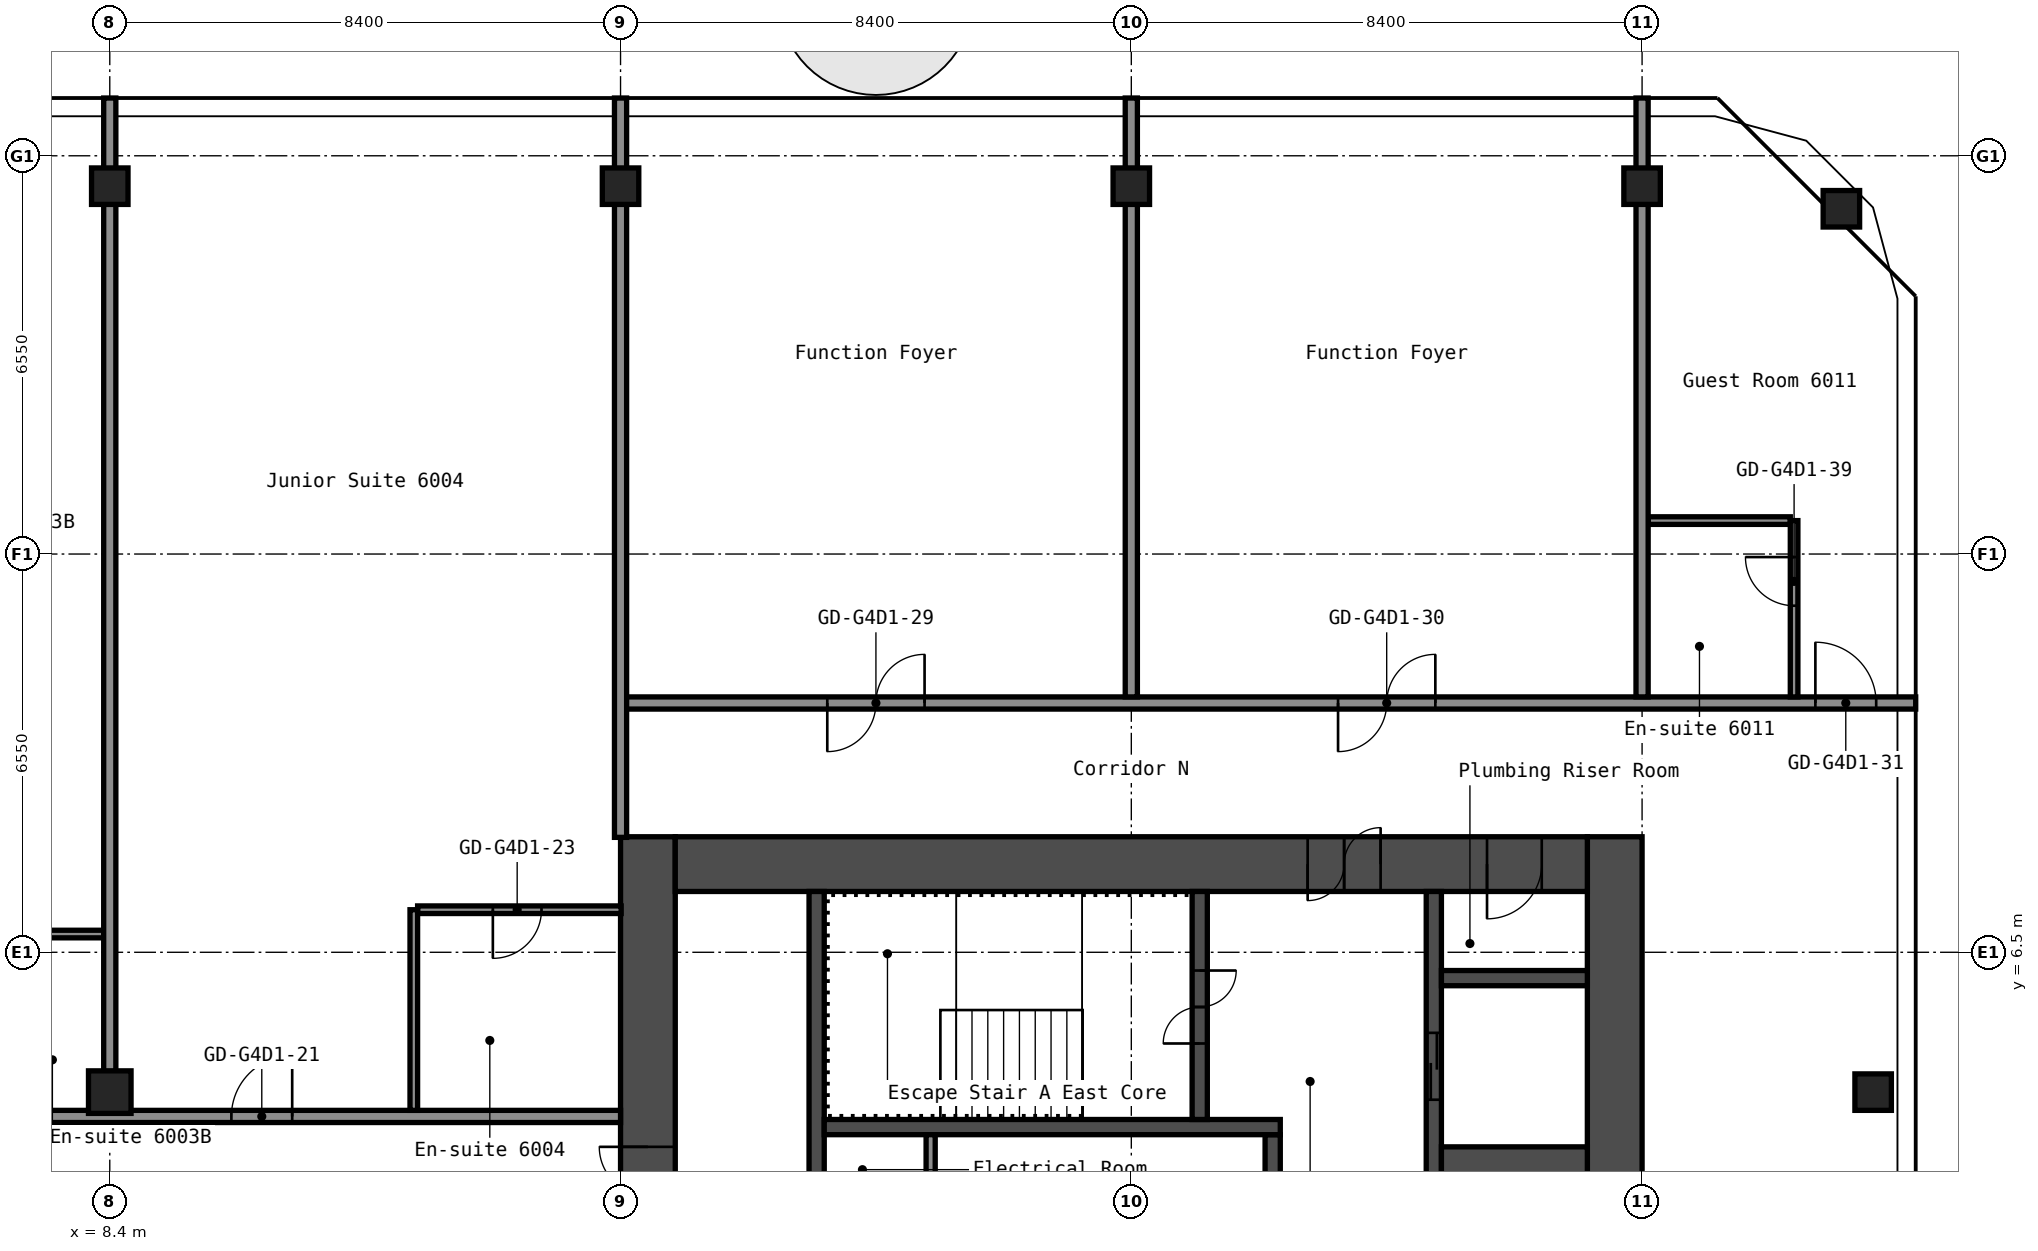
"""IFC4 building model, lengths in metres.
Left out: names, types, materials, properties, quantities, classifications, styles, units other than length and angle.
Written with IfcOpenShell. Run it as: python <this file> out.ifc"""

import sys

from ifc_helpers import new_model, si_unit, direction, frame, frame_2d, origin, origin_2d, place, context, subcontext, project, spatial, rectangle, hollow_rectangle, extrude, element, fill, save


model = new_model("IFC4")
c1 = context("Model", 3, precision=1e-05, world=origin(), true_north=direction((0.0, 1.0)))
c2 = subcontext(c1, "Body", "Model", "MODEL_VIEW")
j1 = project(units=[si_unit("LENGTHUNIT", "METRE"), si_unit("PLANEANGLEUNIT", "RADIAN")], contexts=[c1])
p1 = place(None, origin())
s1 = spatial("IfcSite", under=j1, at=p1, CompositionType="ELEMENT")
p2 = place(p1, origin())
s2 = spatial("IfcBuilding", under=s1, at=p2, CompositionType="ELEMENT")
p3 = place(p2, frame((0.0, 0.0, 212.2)))
s3 = spatial("IfcBuildingStorey", under=s2, at=p3, CompositionType="ELEMENT", Elevation=212.2)
p4 = place(p3, frame((8.4, 4.2, 0.0), z_axis=(0.0, 0.0, 1.0), x_axis=(1.0, 0.0, 0.0)))
e1 = element("IfcColumn", 1, at=p4, inside=s3, PredefinedType="COLUMN", context=c2, shape_type="SweptSolid", body=[
    extrude(hollow_rectangle(XDim=0.7, YDim=0.7, WallThickness=0.028, at=origin_2d()), origin(), (0.0, 0.0, 1.0), 2.75),
])
for number, where, z_axis, x_axis in (
    (2, (8.4, 19.1, 0.0), (0.0, 0.0, 1.0), (1.0, 0.0, 0.0)),
    (3, (16.8, 19.1, 0.0), (0.0, 0.0, 1.0), (1.0, 0.0, 0.0)),
    (4, (25.2, 19.1, 0.0), (0.0, 0.0, 1.0), (1.0, 0.0, 0.0)),
    (5, (33.6, 19.1, 0.0), (0.0, 0.0, 1.0), (1.0, 0.0, 0.0)),
    (6, (37.4, 4.2, 0.0), (0.0, 0.0, 1.0), (1.0, 0.0, 0.0)),
    (7, (36.878, 18.729, 0.0), (0.0, 0.0, 1.0), (1.0, 0.0, 0.0)),
):
    element("IfcColumn", number, at=place(p3, frame(where, z_axis=z_axis, x_axis=x_axis)), inside=s3, PredefinedType="COLUMN", context=c2, shape_type="SweptSolid", body=[
        extrude(hollow_rectangle(XDim=0.6, YDim=0.6, WallThickness=0.025, InnerFilletRadius=0.038, OuterFilletRadius=0.062, at=origin_2d()), origin(), (0.0, 0.0, 1.0), 2.75),
    ])
p5 = place(p3, frame((17.25, -8.4, 0.0), z_axis=(0.0, 0.0, 1.0), x_axis=(0.0, 1.0, 0.0)))
e8 = element("IfcWall", 8, at=p5, inside=s3, PredefinedType="SHEAR", context=c2, shape_type="SweptSolid", body=[
    extrude(rectangle(XDim=16.8, YDim=0.9, at=frame_2d((8.4, 0.0))), origin(), (0.0, 0.0, 1.0), 2.75),
])
p6 = place(p5, frame((10.1, 0.0, 0.0)))
e9 = element("IfcOpeningElement", 9, at=p6, cuts=e8, PredefinedType="OPENING", context=c2, shape_type="SweptSolid", body=[
    extrude(rectangle(XDim=1.6, YDim=2.1, at=frame_2d((0.8, 1.05))), frame((0.0, 0.46, 0.0), z_axis=(0.0, -1.0, 0.0), x_axis=(1.0, 0.0, 0.0)), (0.0, 0.0, 1.0), 0.92),
])
p7 = place(p3, frame((33.15, -8.4, 0.0), z_axis=(0.0, 0.0, 1.0), x_axis=(0.0, 1.0, 0.0)))
e10 = element("IfcWall", 10, at=p7, inside=s3, PredefinedType="SHEAR", context=c2, shape_type="SweptSolid", body=[
    extrude(rectangle(XDim=16.8, YDim=0.9, at=frame_2d((8.4, 0.0))), origin(), (0.0, 0.0, 1.0), 2.75),
])
p8 = place(p3, frame((17.7, 7.95, 0.0), z_axis=(0.0, 0.0, 1.0), x_axis=(1.0, 0.0, 0.0)))
e11 = element("IfcWall", 11, at=p8, inside=s3, PredefinedType="SHEAR", context=c2, shape_type="SweptSolid", body=[
    extrude(rectangle(XDim=15.0, YDim=0.9, at=frame_2d((7.5, 0.0))), origin(), (0.0, 0.0, 1.0), 2.75),
])
p9 = place(p8, frame((10.4, 0.0, 0.0)))
e12 = element("IfcOpeningElement", 12, at=p9, cuts=e11, PredefinedType="OPENING", context=c2, shape_type="SweptSolid", body=[
    extrude(rectangle(XDim=1.2, YDim=2.1, at=frame_2d((0.6, 1.05))), frame((0.0, 0.46, 0.0), z_axis=(0.0, -1.0, 0.0), x_axis=(1.0, 0.0, 0.0)), (0.0, 0.0, 1.0), 0.92),
])
p10 = place(p8, frame((13.35, 0.0, 0.0)))
e13 = element("IfcOpeningElement", 13, at=p10, cuts=e11, PredefinedType="OPENING", context=c2, shape_type="SweptSolid", body=[
    extrude(rectangle(XDim=0.9, YDim=2.1, at=frame_2d((0.45, 1.05))), frame((0.0, 0.46, 0.0), z_axis=(0.0, -1.0, 0.0), x_axis=(1.0, 0.0, 0.0)), (0.0, 0.0, 1.0), 0.92),
])
p11 = place(p3, frame((20.025, 1.2, 0.0), z_axis=(0.0, 0.0, 1.0), x_axis=(0.0, 1.0, 0.0)))
e14 = element("IfcWall", 14, at=p11, inside=s3, PredefinedType="SHEAR", context=c2, shape_type="SweptSolid", body=[
    extrude(rectangle(XDim=6.3, YDim=0.25, at=frame_2d((3.15, 0.0))), origin(), (0.0, 0.0, 1.0), 2.75),
])
p12 = place(p3, frame((27.525, 1.45, 0.0), z_axis=(0.0, 0.0, 1.0), x_axis=(0.0, 1.0, 0.0)))
e15 = element("IfcWall", 15, at=p12, inside=s3, PredefinedType="SHEAR", context=c2, shape_type="SweptSolid", body=[
    extrude(rectangle(XDim=2.05, YDim=0.25, at=frame_2d((1.025, 0.0))), origin(), (0.0, 0.0, 1.0), 2.75),
])
p13 = place(p3, frame((20.15, 3.625, 0.0), z_axis=(0.0, 0.0, 1.0), x_axis=(1.0, 0.0, 0.0)))
e16 = element("IfcWall", 16, at=p13, inside=s3, PredefinedType="SHEAR", context=c2, shape_type="SweptSolid", body=[
    extrude(rectangle(XDim=7.5, YDim=0.25, at=frame_2d((3.75, 0.0))), origin(), (0.0, 0.0, 1.0), 2.75),
])
p14 = place(p3, frame((26.325, 3.75, 0.0), z_axis=(0.0, 0.0, 1.0), x_axis=(0.0, 1.0, 0.0)))
e17 = element("IfcWall", 17, at=p14, inside=s3, PredefinedType="SHEAR", context=c2, shape_type="SweptSolid", body=[
    extrude(rectangle(XDim=3.75, YDim=0.25, at=frame_2d((1.875, 0.0))), origin(), (0.0, 0.0, 1.0), 2.75),
])
p15 = place(p14, frame((1.25, 0.0, 0.0)))
e18 = element("IfcOpeningElement", 18, at=p15, cuts=e17, PredefinedType="OPENING", context=c2, shape_type="SweptSolid", body=[
    extrude(rectangle(XDim=1.2, YDim=2.1, at=frame_2d((0.6, 1.05))), frame((0.0, 0.135, 0.0), z_axis=(0.0, -1.0, 0.0), x_axis=(1.0, 0.0, 0.0)), (0.0, 0.0, 1.0), 0.27),
])
p16 = place(p3, frame((30.175, 1.45, 0.0), z_axis=(0.0, 0.0, 1.0), x_axis=(0.0, 1.0, 0.0)))
e19 = element("IfcWall", 19, at=p16, inside=s3, PredefinedType="SHEAR", context=c2, shape_type="SweptSolid", body=[
    extrude(rectangle(XDim=6.05, YDim=0.25, at=frame_2d((3.025, 0.0))), origin(), (0.0, 0.0, 1.0), 2.75),
])
p17 = place(p16, frame((2.625, 0.0, 0.0)))
e20 = element("IfcOpeningElement", 20, at=p17, cuts=e19, PredefinedType="OPENING", context=c2, shape_type="SweptSolid", body=[
    extrude(rectangle(XDim=1.1, YDim=2.1, at=frame_2d((0.55, 1.05))), frame((0.0, 0.135, 0.0), z_axis=(0.0, -1.0, 0.0), x_axis=(1.0, 0.0, 0.0)), (0.0, 0.0, 1.0), 0.27),
])
p18 = place(p3, frame((30.3, 2.375, 0.0), z_axis=(0.0, 0.0, 1.0), x_axis=(1.0, 0.0, 0.0)))
e21 = element("IfcWall", 21, at=p18, inside=s3, PredefinedType="SHEAR", context=c2, shape_type="SweptSolid", body=[
    extrude(rectangle(XDim=2.4, YDim=1.85, at=frame_2d((1.2, 0.0))), origin(), (0.0, 0.0, 1.0), 2.75),
])
p19 = place(p3, frame((30.3, 6.075, 0.0), z_axis=(0.0, 0.0, 1.0), x_axis=(1.0, 0.0, 0.0)))
e22 = element("IfcWall", 22, at=p19, inside=s3, PredefinedType="SHEAR", context=c2, shape_type="SweptSolid", body=[
    extrude(rectangle(XDim=2.4, YDim=0.25, at=frame_2d((1.2, 0.0))), origin(), (0.0, 0.0, 1.0), 2.75),
])
p20 = place(p3, frame((21.9, 1.45, 0.0), z_axis=(0.0, 0.0, 1.0), x_axis=(0.0, 1.0, 0.0)))
e23 = element("IfcWall", 23, at=p20, inside=s3, PredefinedType="PARTITIONING", context=c2, shape_type="SweptSolid", body=[
    extrude(rectangle(XDim=2.05, YDim=0.15, at=frame_2d((1.025, 0.0))), origin(), (0.0, 0.0, 1.0), 2.75),
])
p21 = place(p3, frame((-16.8, 3.8, 0.0), z_axis=(0.0, 0.0, 1.0), x_axis=(1.0, 0.0, 0.0)))
e24 = element("IfcWall", 24, at=p21, inside=s3, PredefinedType="PARTITIONING", context=c2, shape_type="SweptSolid", body=[
    extrude(rectangle(XDim=33.6, YDim=0.2, at=frame_2d((16.8, 0.0))), origin(), (0.0, 0.0, 1.0), 2.75),
])
p22 = place(p21, frame((2.85, 0.0, 0.0)))
e25 = element("IfcOpeningElement", 25, at=p22, cuts=e24, PredefinedType="OPENING", context=c2, shape_type="SweptSolid", body=[
    extrude(rectangle(XDim=1.0, YDim=2.1, at=frame_2d((0.5, 1.05))), frame((0.0, 0.11, 0.0), z_axis=(0.0, -1.0, 0.0), x_axis=(1.0, 0.0, 0.0)), (0.0, 0.0, 1.0), 0.22),
])
p23 = place(p21, frame((4.55, 0.0, 0.0)))
e26 = element("IfcOpeningElement", 26, at=p23, cuts=e24, PredefinedType="OPENING", context=c2, shape_type="SweptSolid", body=[
    extrude(rectangle(XDim=1.0, YDim=2.1, at=frame_2d((0.5, 1.05))), frame((0.0, 0.11, 0.0), z_axis=(0.0, -1.0, 0.0), x_axis=(1.0, 0.0, 0.0)), (0.0, 0.0, 1.0), 0.22),
])
p24 = place(p21, frame((10.4, 0.0, 0.0)))
e27 = element("IfcOpeningElement", 27, at=p24, cuts=e24, PredefinedType="OPENING", context=c2, shape_type="SweptSolid", body=[
    extrude(rectangle(XDim=1.0, YDim=2.1, at=frame_2d((0.5, 1.05))), frame((0.0, 0.11, 0.0), z_axis=(0.0, -1.0, 0.0), x_axis=(1.0, 0.0, 0.0)), (0.0, 0.0, 1.0), 0.22),
])
p25 = place(p21, frame((19.65, 0.0, 0.0)))
e28 = element("IfcOpeningElement", 28, at=p25, cuts=e24, PredefinedType="OPENING", context=c2, shape_type="SweptSolid", body=[
    extrude(rectangle(XDim=1.0, YDim=2.1, at=frame_2d((0.5, 1.05))), frame((0.0, 0.11, 0.0), z_axis=(0.0, -1.0, 0.0), x_axis=(1.0, 0.0, 0.0)), (0.0, 0.0, 1.0), 0.22),
])
p26 = place(p21, frame((21.35, 0.0, 0.0)))
e29 = element("IfcOpeningElement", 29, at=p26, cuts=e24, PredefinedType="OPENING", context=c2, shape_type="SweptSolid", body=[
    extrude(rectangle(XDim=1.0, YDim=2.1, at=frame_2d((0.5, 1.05))), frame((0.0, 0.11, 0.0), z_axis=(0.0, -1.0, 0.0), x_axis=(1.0, 0.0, 0.0)), (0.0, 0.0, 1.0), 0.22),
])
p27 = place(p21, frame((27.2, 0.0, 0.0)))
e30 = element("IfcOpeningElement", 30, at=p27, cuts=e24, PredefinedType="OPENING", context=c2, shape_type="SweptSolid", body=[
    extrude(rectangle(XDim=1.0, YDim=2.1, at=frame_2d((0.5, 1.05))), frame((0.0, 0.11, 0.0), z_axis=(0.0, -1.0, 0.0), x_axis=(1.0, 0.0, 0.0)), (0.0, 0.0, 1.0), 0.22),
])
p28 = place(p3, frame((5.962, 6.8, 0.0), z_axis=(0.0, 0.0, 1.0), x_axis=(1.0, 0.0, 0.0)))
e31 = element("IfcWall", 31, at=p28, inside=s3, PredefinedType="PARTITIONING", context=c2, shape_type="SweptSolid", body=[
    extrude(rectangle(XDim=2.338, YDim=0.125, at=frame_2d((1.169, 0.0))), origin(), (0.0, 0.0, 1.0), 2.75),
])
p29 = place(p3, frame((13.462, 7.2, 0.0), z_axis=(0.0, 0.0, 1.0), x_axis=(1.0, 0.0, 0.0)))
e32 = element("IfcWall", 32, at=p29, inside=s3, PredefinedType="PARTITIONING", context=c2, shape_type="SweptSolid", body=[
    extrude(rectangle(XDim=3.348, YDim=0.125, at=frame_2d((1.674, 0.0))), origin(), (0.0, 0.0, 1.0), 2.75),
])
p30 = place(p29, frame((1.238, 0.0, 0.0)))
e33 = element("IfcOpeningElement", 33, at=p30, cuts=e32, PredefinedType="OPENING", context=c2, shape_type="SweptSolid", body=[
    extrude(rectangle(XDim=0.8, YDim=2.1, at=frame_2d((0.4, 1.05))), frame((0.0, 0.073, 0.0), z_axis=(0.0, -1.0, 0.0), x_axis=(1.0, 0.0, 0.0)), (0.0, 0.0, 1.0), 0.145),
])
p31 = place(p3, frame((16.8, 10.6, 0.0), z_axis=(0.0, 0.0, 1.0), x_axis=(1.0, 0.0, 0.0)))
e34 = element("IfcWall", 34, at=p31, inside=s3, PredefinedType="PARTITIONING", context=c2, shape_type="SweptSolid", body=[
    extrude(rectangle(XDim=21.3, YDim=0.2, at=frame_2d((10.65, 0.0))), origin(), (0.0, 0.0, 1.0), 2.75),
])
p32 = place(p31, frame((3.4, 0.0, 0.0)))
e35 = element("IfcOpeningElement", 35, at=p32, cuts=e34, PredefinedType="OPENING", context=c2, shape_type="SweptSolid", body=[
    extrude(rectangle(XDim=1.6, YDim=2.1, at=frame_2d((0.8, 1.05))), frame((0.0, 0.11, 0.0), z_axis=(0.0, -1.0, 0.0), x_axis=(1.0, 0.0, 0.0)), (0.0, 0.0, 1.0), 0.22),
])
p33 = place(p31, frame((11.8, 0.0, 0.0)))
e36 = element("IfcOpeningElement", 36, at=p33, cuts=e34, PredefinedType="OPENING", context=c2, shape_type="SweptSolid", body=[
    extrude(rectangle(XDim=1.6, YDim=2.1, at=frame_2d((0.8, 1.05))), frame((0.0, 0.11, 0.0), z_axis=(0.0, -1.0, 0.0), x_axis=(1.0, 0.0, 0.0)), (0.0, 0.0, 1.0), 0.22),
])
p34 = place(p31, frame((19.65, 0.0, 0.0)))
e37 = element("IfcOpeningElement", 37, at=p34, cuts=e34, PredefinedType="OPENING", context=c2, shape_type="SweptSolid", body=[
    extrude(rectangle(XDim=1.0, YDim=2.1, at=frame_2d((0.5, 1.05))), frame((0.0, 0.11, 0.0), z_axis=(0.0, -1.0, 0.0), x_axis=(1.0, 0.0, 0.0)), (0.0, 0.0, 1.0), 0.22),
])
p35 = place(p3, frame((33.7, 13.6, 0.0), z_axis=(0.0, 0.0, 1.0), x_axis=(1.0, 0.0, 0.0)))
e38 = element("IfcWall", 38, at=p35, inside=s3, PredefinedType="PARTITIONING", context=c2, shape_type="SweptSolid", body=[
    extrude(rectangle(XDim=2.338, YDim=0.125, at=frame_2d((1.169, 0.0))), origin(), (0.0, 0.0, 1.0), 2.75),
])
p36 = place(p3, frame((8.4, 4.54, 0.0), z_axis=(0.0, 0.0, 1.0), x_axis=(0.0, 1.0, 0.0)))
e39 = element("IfcWall", 39, at=p36, inside=s3, PredefinedType="PARTITIONING", context=c2, shape_type="SweptSolid", body=[
    extrude(rectangle(XDim=16.01, YDim=0.2, at=frame_2d((8.005, 0.0))), origin(), (0.0, 0.0, 1.0), 2.75),
])
p37 = place(p3, frame((13.4, 3.9, 0.0), z_axis=(0.0, 0.0, 1.0), x_axis=(0.0, 1.0, 0.0)))
e40 = element("IfcWall", 40, at=p37, inside=s3, PredefinedType="PARTITIONING", context=c2, shape_type="SweptSolid", body=[
    extrude(rectangle(XDim=3.3, YDim=0.125, at=frame_2d((1.65, 0.0))), origin(), (0.0, 0.0, 1.0), 2.75),
])
p38 = place(p3, frame((16.8, 8.39, 0.0), z_axis=(0.0, 0.0, 1.0), x_axis=(0.0, 1.0, 0.0)))
e41 = element("IfcWall", 41, at=p38, inside=s3, PredefinedType="PARTITIONING", context=c2, shape_type="SweptSolid", body=[
    extrude(rectangle(XDim=12.16, YDim=0.2, at=frame_2d((6.08, 0.0))), origin(), (0.0, 0.0, 1.0), 2.75),
])
for number, where, z_axis, x_axis in (
    (42, (25.2, 10.7, 0.0), (0.0, 0.0, 1.0), (0.0, 1.0, 0.0)),
    (43, (33.6, 10.7, 0.0), (0.0, 0.0, 1.0), (0.0, 1.0, 0.0)),
):
    element("IfcWall", number, at=place(p3, frame(where, z_axis=z_axis, x_axis=x_axis)), inside=s3, PredefinedType="PARTITIONING", context=c2, shape_type="SweptSolid", body=[
        extrude(rectangle(XDim=9.85, YDim=0.2, at=frame_2d((4.925, 0.0))), origin(), (0.0, 0.0, 1.0), 2.75),
    ])
p39 = place(p3, frame((36.1, 10.7, 0.0), z_axis=(0.0, 0.0, 1.0), x_axis=(0.0, 1.0, 0.0)))
e44 = element("IfcWall", 44, at=p39, inside=s3, PredefinedType="PARTITIONING", context=c2, shape_type="SweptSolid", body=[
    extrude(rectangle(XDim=2.9, YDim=0.125, at=frame_2d((1.45, 0.0))), origin(), (0.0, 0.0, 1.0), 2.75),
])
p40 = place(p39, frame((1.5, 0.0, 0.0)))
e45 = element("IfcOpeningElement", 45, at=p40, cuts=e44, PredefinedType="OPENING", context=c2, shape_type="SweptSolid", body=[
    extrude(rectangle(XDim=0.8, YDim=2.1, at=frame_2d((0.4, 1.05))), frame((0.0, 0.073, 0.0), z_axis=(0.0, -1.0, 0.0), x_axis=(1.0, 0.0, 0.0)), (0.0, 0.0, 1.0), 0.145),
])
p41 = place(p6, origin())
e46 = element("IfcDoor", 46, at=p41, inside=s3, OperationType="DOUBLE_DOOR_SINGLE_SWING", PredefinedType="DOOR", context=c2, shape_type="SweptSolid", body=[
    extrude(rectangle(XDim=1.6, YDim=2.1, at=frame_2d((0.8, 1.05))), frame((0.0, 0.025, 0.0), z_axis=(0.0, -1.0, 0.0), x_axis=(1.0, 0.0, 0.0)), (0.0, 0.0, 1.0), 0.05),
])
fill(e9, e46)
p42 = place(p9, origin())
e47 = element("IfcDoor", 47, at=p42, inside=s3, OperationType="DOUBLE_DOOR_SINGLE_SWING", PredefinedType="DOOR", context=c2, shape_type="SweptSolid", body=[
    extrude(rectangle(XDim=1.2, YDim=2.1, at=frame_2d((0.6, 1.05))), frame((0.0, 0.025, 0.0), z_axis=(0.0, -1.0, 0.0), x_axis=(1.0, 0.0, 0.0)), (0.0, 0.0, 1.0), 0.05),
])
fill(e12, e47)
p43 = place(p10, origin())
e48 = element("IfcDoor", 48, at=p43, inside=s3, OperationType="SINGLE_SWING_LEFT", PredefinedType="DOOR", context=c2, shape_type="SweptSolid", body=[
    extrude(rectangle(XDim=0.9, YDim=2.1, at=frame_2d((0.45, 1.05))), frame((0.0, 0.025, 0.0), z_axis=(0.0, -1.0, 0.0), x_axis=(1.0, 0.0, 0.0)), (0.0, 0.0, 1.0), 0.05),
])
fill(e13, e48)
p44 = place(p15, origin())
e49 = element("IfcDoor", 49, at=p44, inside=s3, OperationType="DOUBLE_DOOR_SINGLE_SWING", PredefinedType="DOOR", context=c2, shape_type="SweptSolid", body=[
    extrude(rectangle(XDim=1.2, YDim=2.1, at=frame_2d((0.6, 1.05))), frame((0.0, 0.025, 0.0), z_axis=(0.0, -1.0, 0.0), x_axis=(1.0, 0.0, 0.0)), (0.0, 0.0, 1.0), 0.05),
])
fill(e18, e49)
p45 = place(p17, origin())
e50 = element("IfcDoor", 50, at=p45, inside=s3, OperationType="DOUBLE_DOOR_SLIDING", PredefinedType="DOOR", context=c2, shape_type="SweptSolid", body=[
    extrude(rectangle(XDim=1.1, YDim=2.1, at=frame_2d((0.55, 1.05))), frame((0.0, 0.025, 0.0), z_axis=(0.0, -1.0, 0.0), x_axis=(1.0, 0.0, 0.0)), (0.0, 0.0, 1.0), 0.05),
])
fill(e20, e50)
p46 = place(p27, origin())
e51 = element("IfcDoor", 51, at=p46, inside=s3, OperationType="SINGLE_SWING_LEFT", PredefinedType="DOOR", context=c2, shape_type="SweptSolid", body=[
    extrude(rectangle(XDim=1.0, YDim=2.1, at=frame_2d((0.5, 1.05))), frame((0.0, 0.025, 0.0), z_axis=(0.0, -1.0, 0.0), x_axis=(1.0, 0.0, 0.0)), (0.0, 0.0, 1.0), 0.05),
])
fill(e30, e51)
p47 = place(p30, origin())
e52 = element("IfcDoor", 52, at=p47, inside=s3, OperationType="SINGLE_SWING_LEFT", PredefinedType="DOOR", context=c2, shape_type="SweptSolid", body=[
    extrude(rectangle(XDim=0.8, YDim=2.1, at=frame_2d((0.4, 1.05))), frame((0.0, 0.025, 0.0), z_axis=(0.0, -1.0, 0.0), x_axis=(1.0, 0.0, 0.0)), (0.0, 0.0, 1.0), 0.05),
])
fill(e33, e52)
p48 = place(p32, origin())
e53 = element("IfcDoor", 53, at=p48, inside=s3, OperationType="DOUBLE_DOOR_SINGLE_SWING", PredefinedType="DOOR", context=c2, shape_type="SweptSolid", body=[
    extrude(rectangle(XDim=1.6, YDim=2.1, at=frame_2d((0.8, 1.05))), frame((0.0, 0.025, 0.0), z_axis=(0.0, -1.0, 0.0), x_axis=(1.0, 0.0, 0.0)), (0.0, 0.0, 1.0), 0.05),
])
fill(e35, e53)
p49 = place(p33, origin())
e54 = element("IfcDoor", 54, at=p49, inside=s3, OperationType="DOUBLE_DOOR_SINGLE_SWING", PredefinedType="DOOR", context=c2, shape_type="SweptSolid", body=[
    extrude(rectangle(XDim=1.6, YDim=2.1, at=frame_2d((0.8, 1.05))), frame((0.0, 0.025, 0.0), z_axis=(0.0, -1.0, 0.0), x_axis=(1.0, 0.0, 0.0)), (0.0, 0.0, 1.0), 0.05),
])
fill(e36, e54)
p50 = place(p34, origin())
e55 = element("IfcDoor", 55, at=p50, inside=s3, OperationType="SINGLE_SWING_RIGHT", PredefinedType="DOOR", context=c2, shape_type="SweptSolid", body=[
    extrude(rectangle(XDim=1.0, YDim=2.1, at=frame_2d((0.5, 1.05))), frame((0.0, 0.025, 0.0), z_axis=(0.0, -1.0, 0.0), x_axis=(1.0, 0.0, 0.0)), (0.0, 0.0, 1.0), 0.05),
])
fill(e37, e55)
p51 = place(p40, origin())
e56 = element("IfcDoor", 56, at=p51, inside=s3, OperationType="SINGLE_SWING_LEFT", PredefinedType="DOOR", context=c2, shape_type="SweptSolid", body=[
    extrude(rectangle(XDim=0.8, YDim=2.1, at=frame_2d((0.4, 1.05))), frame((0.0, 0.025, 0.0), z_axis=(0.0, -1.0, 0.0), x_axis=(1.0, 0.0, 0.0)), (0.0, 0.0, 1.0), 0.05),
])
fill(e45, e56)
save(model, sys.argv[1])
